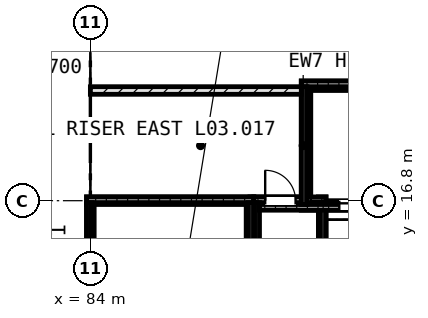
"""IFC4 building model, lengths in metres.
Left out: names, types, materials, properties, quantities, classifications, styles, units other than length and angle.
Written with IfcOpenShell. Run it as: python <this file> out.ifc"""

import sys

from ifc_helpers import new_model, si_unit, direction, frame, frame_2d, origin, place, context, subcontext, project, spatial, rectangle, extrude, element, fill, save


model = new_model("IFC4")
c1 = context("Model", 3, precision=1e-05, world=origin(), true_north=direction((0.0, 1.0)))
c2 = subcontext(c1, "Body", "Model", "MODEL_VIEW")
j1 = project(units=[si_unit("LENGTHUNIT", "METRE"), si_unit("PLANEANGLEUNIT", "RADIAN")], contexts=[c1])
p1 = place(None, origin())
s1 = spatial("IfcSite", under=j1, at=p1, CompositionType="ELEMENT")
p2 = place(p1, origin())
s2 = spatial("IfcBuilding", under=s1, at=p2, CompositionType="ELEMENT")
p3 = place(p2, frame((0.0, 0.0, 14.4)))
s3 = spatial("IfcBuildingStorey", under=s2, at=p3, CompositionType="ELEMENT", Elevation=14.4)
p4 = place(p3, frame((89.55, 16.675, -0.3), z_axis=(0.0, 0.0, 1.0), x_axis=(1.0, 0.0, 0.0)))
e1 = element("IfcWall", 1, at=p4, inside=s3, PredefinedType="SHEAR", context=c2, shape_type="SweptSolid", body=[
    extrude(rectangle(XDim=3.1, YDim=0.25, at=frame_2d((1.55, 0.0))), origin(), (0.0, 0.0, 1.0), 3.0),
])
p5 = place(p4, frame((1.0, 0.0, 0.3)))
e2 = element("IfcOpeningElement", 2, at=p5, cuts=e1, PredefinedType="OPENING", context=c2, shape_type="SweptSolid", body=[
    extrude(rectangle(XDim=1.1, YDim=2.1, at=frame_2d((0.55, 1.05))), frame((0.0, 0.135, 0.0), z_axis=(0.0, -1.0, 0.0), x_axis=(1.0, 0.0, 0.0)), (0.0, 0.0, 1.0), 0.27),
])
p6 = place(p3, frame((89.55, 19.825, -0.3), z_axis=(0.0, 0.0, 1.0), x_axis=(1.0, 0.0, 0.0)))
e3 = element("IfcWall", 3, at=p6, inside=s3, PredefinedType="SHEAR", context=c2, shape_type="SweptSolid", body=[
    extrude(rectangle(XDim=3.1, YDim=0.25, at=frame_2d((1.55, 0.0))), origin(), (0.0, 0.0, 1.0), 3.0),
])
p7 = place(p3, frame((89.675, 16.8, -0.3), z_axis=(0.0, 0.0, 1.0), x_axis=(0.0, 1.0, 0.0)))
e4 = element("IfcWall", 4, at=p7, inside=s3, PredefinedType="SHEAR", context=c2, shape_type="SweptSolid", body=[
    extrude(rectangle(XDim=2.9, YDim=0.25, at=frame_2d((1.45, 0.0))), origin(), (0.0, 0.0, 1.0), 3.0),
])
p8 = place(p3, frame((83.9, 16.8, -0.3), z_axis=(0.0, 0.0, 1.0), x_axis=(1.0, 0.0, 0.0)))
e5 = element("IfcWall", 5, at=p8, inside=s3, PredefinedType="SHEAR", context=c2, shape_type="SweptSolid", body=[
    extrude(rectangle(XDim=4.4, YDim=0.2, at=frame_2d((2.2, 0.0))), origin(), (0.0, 0.0, 1.0), 3.0),
])
p9 = place(p3, frame((84.0, 8.5, -0.3), z_axis=(0.0, 0.0, 1.0), x_axis=(0.0, 1.0, 0.0)))
e6 = element("IfcWall", 6, at=p9, inside=s3, PredefinedType="SHEAR", context=c2, shape_type="SweptSolid", body=[
    extrude(rectangle(XDim=8.2, YDim=0.2, at=frame_2d((4.1, 0.0))), origin(), (0.0, 0.0, 1.0), 3.0),
])
p10 = place(p3, frame((88.2, 8.5, -0.3), z_axis=(0.0, 0.0, 1.0), x_axis=(0.0, 1.0, 0.0)))
e7 = element("IfcWall", 7, at=p10, inside=s3, PredefinedType="SHEAR", context=c2, shape_type="SweptSolid", body=[
    extrude(rectangle(XDim=8.2, YDim=0.2, at=frame_2d((4.1, 0.0))), origin(), (0.0, 0.0, 1.0), 3.0),
])
p11 = place(p10, frame((0.8, 0.0, 0.3)))
e8 = element("IfcOpeningElement", 8, at=p11, cuts=e7, PredefinedType="OPENING", context=c2, shape_type="SweptSolid", body=[
    extrude(rectangle(XDim=1.2, YDim=2.2, at=frame_2d((0.6, 1.1))), frame((0.0, 0.11, 0.0), z_axis=(0.0, -1.0, 0.0), x_axis=(1.0, 0.0, 0.0)), (0.0, 0.0, 1.0), 0.22),
])
p12 = place(p3, frame((88.2, 16.8, -0.3), z_axis=(0.0, 0.0, 1.0), x_axis=(1.0, 0.0, 0.0)))
e9 = element("IfcWall", 9, at=p12, inside=s3, PredefinedType="SHEAR", context=c2, shape_type="SweptSolid", body=[
    extrude(rectangle(XDim=1.35, YDim=0.2, at=frame_2d((0.675, 0.0))), origin(), (0.0, 0.0, 1.0), 3.0),
])
p13 = place(p12, frame((0.4, 0.0, 0.3)))
e10 = element("IfcOpeningElement", 10, at=p13, cuts=e9, PredefinedType="OPENING", context=c2, shape_type="SweptSolid", body=[
    extrude(rectangle(XDim=0.8, YDim=2.1, at=frame_2d((0.4, 1.05))), frame((0.0, 0.11, 0.0), z_axis=(0.0, -1.0, 0.0), x_axis=(1.0, 0.0, 0.0)), (0.0, 0.0, 1.0), 0.22),
])
p14 = place(p3, frame((90.1, 8.3, -0.3), z_axis=(0.0, 0.0, 1.0), x_axis=(0.0, 1.0, 0.0)))
e11 = element("IfcWall", 11, at=p14, inside=s3, PredefinedType="SHEAR", context=c2, shape_type="SweptSolid", body=[
    extrude(rectangle(XDim=8.6, YDim=0.2, at=frame_2d((4.3, 0.0))), origin(), (0.0, 0.0, 1.0), 3.0),
])
p15 = place(p14, frame((3.25, 0.0, 0.3)))
e12 = element("IfcOpeningElement", 12, at=p15, cuts=e11, PredefinedType="OPENING", context=c2, shape_type="SweptSolid", body=[
    extrude(rectangle(XDim=2.1, YDim=2.2, at=frame_2d((1.05, 1.1))), frame((0.0, 0.11, 0.0), z_axis=(0.0, -1.0, 0.0), x_axis=(1.0, 0.0, 0.0)), (0.0, 0.0, 1.0), 0.22),
])
p16 = place(p3, frame((83.9, 16.825, 2.9), z_axis=(0.0, 0.0, 1.0), x_axis=(1.0, 0.0, 0.0)))
e13 = element("IfcWall", 13, at=p16, inside=s3, PredefinedType="PARAPET", context=c2, shape_type="SweptSolid", body=[
    extrude(rectangle(XDim=4.4, YDim=0.15, at=frame_2d((2.2, 0.0))), origin(), (0.0, 0.0, 1.0), 0.45),
])
for number, where, z_axis, x_axis in (
    (14, (83.975, 8.45, 2.9), (0.0, 0.0, 1.0), (0.0, 1.0, 0.0)),
    (15, (88.225, 8.45, 2.9), (0.0, 0.0, 1.0), (0.0, 1.0, 0.0)),
):
    element("IfcWall", number, at=place(p3, frame(where, z_axis=z_axis, x_axis=x_axis)), inside=s3, PredefinedType="PARAPET", context=c2, shape_type="SweptSolid", body=[
        extrude(rectangle(XDim=8.3, YDim=0.15, at=frame_2d((4.15, 0.0))), origin(), (0.0, 0.0, 1.0), 0.45),
    ])
p17 = place(p3, frame((88.3, 16.825, 2.9), z_axis=(0.0, 0.0, 1.0), x_axis=(1.0, 0.0, 0.0)))
e16 = element("IfcWall", 16, at=p17, inside=s3, PredefinedType="PARAPET", context=c2, shape_type="SweptSolid", body=[
    extrude(rectangle(XDim=1.9, YDim=0.15, at=frame_2d((0.95, 0.0))), origin(), (0.0, 0.0, 1.0), 0.45),
])
for number, where, z_axis, x_axis in (
    (17, (88.375, 8.45, 2.9), (0.0, 0.0, 1.0), (0.0, 1.0, 0.0)),
    (18, (90.125, 8.45, 2.9), (0.0, 0.0, 1.0), (0.0, 1.0, 0.0)),
):
    element("IfcWall", number, at=place(p3, frame(where, z_axis=z_axis, x_axis=x_axis)), inside=s3, PredefinedType="PARAPET", context=c2, shape_type="SweptSolid", body=[
        extrude(rectangle(XDim=8.3, YDim=0.15, at=frame_2d((4.15, 0.0))), origin(), (0.0, 0.0, 1.0), 0.45),
    ])
p18 = place(p3, frame((88.45, 16.625, 2.9), z_axis=(0.0, 0.0, 1.0), x_axis=(1.0, 0.0, 0.0)))
e19 = element("IfcWall", 19, at=p18, inside=s3, PredefinedType="PARAPET", context=c2, shape_type="SweptSolid", body=[
    extrude(rectangle(XDim=4.2, YDim=0.15, at=frame_2d((2.1, 0.0))), origin(), (0.0, 0.0, 1.0), 0.45),
])
p19 = place(p3, frame((89.55, 19.875, 2.9), z_axis=(0.0, 0.0, 1.0), x_axis=(1.0, 0.0, 0.0)))
e20 = element("IfcWall", 20, at=p19, inside=s3, PredefinedType="PARAPET", context=c2, shape_type="SweptSolid", body=[
    extrude(rectangle(XDim=3.1, YDim=0.15, at=frame_2d((1.55, 0.0))), origin(), (0.0, 0.0, 1.0), 0.45),
])
p20 = place(p3, frame((89.625, 16.7, 2.9), z_axis=(0.0, 0.0, 1.0), x_axis=(0.0, 1.0, 0.0)))
e21 = element("IfcWall", 21, at=p20, inside=s3, PredefinedType="PARAPET", context=c2, shape_type="SweptSolid", body=[
    extrude(rectangle(XDim=3.1, YDim=0.15, at=frame_2d((1.55, 0.0))), origin(), (0.0, 0.0, 1.0), 0.45),
])
p21 = place(p3, frame((84.0, 19.7, 0.0), z_axis=(0.0, 0.0, 1.0), x_axis=(1.0, 0.0, 0.0)))
e22 = element("IfcWall", 22, at=p21, inside=s3, PredefinedType="SOLIDWALL", context=c2, shape_type="SweptSolid", body=[
    extrude(rectangle(XDim=5.55, YDim=0.2, at=frame_2d((2.775, 0.0))), origin(), (0.0, 0.0, 1.0), 2.7),
])
p22 = place(p5, origin())
e23 = element("IfcDoor", 23, at=p22, inside=s3, OperationType="SLIDING_TO_LEFT", PredefinedType="DOOR", context=c2, shape_type="SweptSolid", body=[
    extrude(rectangle(XDim=1.1, YDim=2.1, at=frame_2d((0.55, 1.05))), frame((0.0, 0.025, 0.0), z_axis=(0.0, -1.0, 0.0), x_axis=(1.0, 0.0, 0.0)), (0.0, 0.0, 1.0), 0.05),
])
fill(e2, e23)
p23 = place(p13, origin())
e24 = element("IfcDoor", 24, at=p23, inside=s3, OperationType="SINGLE_SWING_RIGHT", PredefinedType="DOOR", context=c2, shape_type="SweptSolid", body=[
    extrude(rectangle(XDim=0.8, YDim=2.1, at=frame_2d((0.4, 1.05))), frame((0.0, 0.025, 0.0), z_axis=(0.0, -1.0, 0.0), x_axis=(1.0, 0.0, 0.0)), (0.0, 0.0, 1.0), 0.05),
])
fill(e10, e24)
save(model, sys.argv[1])
